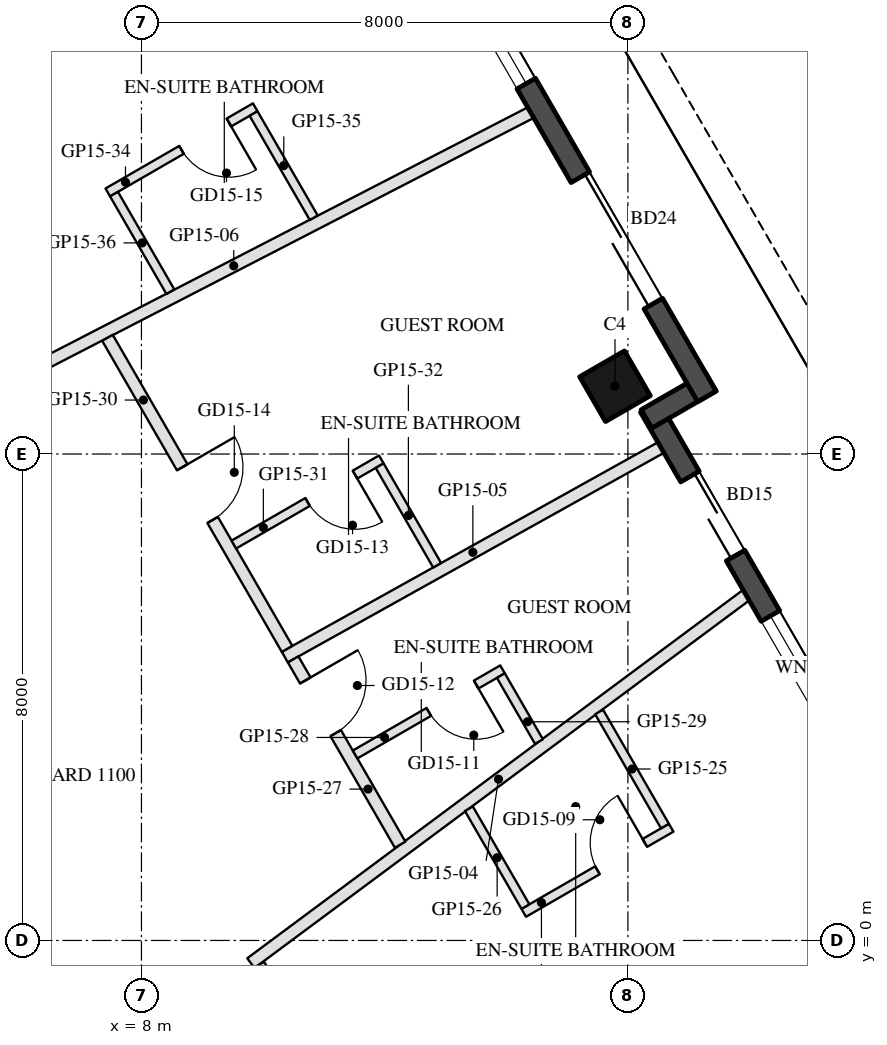
"""IFC4 building model, lengths in metres.
Left out: names, types, materials, properties, quantities, classifications, styles, units other than length and angle.
Written with IfcOpenShell. Run it as: python <this file> out.ifc"""

import sys

from ifc_helpers import new_model, si_unit, direction, frame, frame_2d, origin, origin_2d, place, context, subcontext, project, spatial, rectangle, hollow_rectangle, extrude, element, fill, save


model = new_model("IFC4")
c1 = context("Model", 3, precision=1e-05, world=origin(), true_north=direction((0.0, 1.0)))
c2 = subcontext(c1, "Body", "Model", "MODEL_VIEW")
j1 = project(units=[si_unit("LENGTHUNIT", "METRE"), si_unit("PLANEANGLEUNIT", "RADIAN")], contexts=[c1])
p1 = place(None, origin())
s1 = spatial("IfcSite", under=j1, at=p1, CompositionType="ELEMENT")
p2 = place(p1, origin())
s2 = spatial("IfcBuilding", under=s1, at=p2, CompositionType="ELEMENT")
p3 = place(p2, frame((0.0, 0.0, 172.5)))
s3 = spatial("IfcBuildingStorey", under=s2, at=p3, CompositionType="ELEMENT", Elevation=172.5)
p4 = place(p3, frame((15.788, 9.115, 0.0), z_axis=(0.0, 0.0, 1.0), x_axis=(-0.5, 0.866025403784, 0.0)))
e1 = element("IfcColumn", 1, at=p4, inside=s3, PredefinedType="COLUMN", context=c2, shape_type="SweptSolid", body=[
    extrude(hollow_rectangle(XDim=0.85, YDim=0.85, WallThickness=0.04, at=origin_2d()), origin(), (0.0, 0.0, 1.0), 3.7),
])
p5 = place(p3, frame((19.729, 2.938, 0.0), z_axis=(0.0, 0.0, 1.0), x_axis=(-0.499976430342, 0.866039011305, 0.0)))
e2 = element("IfcWall", 2, at=p5, inside=s3, PredefinedType="SOLIDWALL", context=c2, shape_type="SweptSolid", body=[
    extrude(rectangle(XDim=6.74, YDim=0.35, at=frame_2d((3.37, 0.0))), origin(), (0.0, 0.0, 1.0), 3.55),
])
p6 = place(p5, frame((0.77, 0.0, 0.3)))
e3 = element("IfcOpeningElement", 3, at=p6, cuts=e2, PredefinedType="OPENING", context=c2, shape_type="SweptSolid", body=[
    extrude(rectangle(XDim=2.0, YDim=2.65, at=frame_2d((1.0, 1.325))), frame((0.0, 0.185, 0.0), z_axis=(0.0, -1.0, 0.0), x_axis=(1.0, 0.0, 0.0)), (0.0, 0.0, 1.0), 0.37),
])
p7 = place(p5, frame((3.917, 0.0, 0.0)))
e4 = element("IfcOpeningElement", 4, at=p7, cuts=e2, PredefinedType="OPENING", context=c2, shape_type="SweptSolid", body=[
    extrude(rectangle(XDim=1.5, YDim=2.4, at=frame_2d((0.75, 1.2))), frame((0.0, 0.185, 0.0), z_axis=(0.0, -1.0, 0.0), x_axis=(1.0, 0.0, 0.0)), (0.0, 0.0, 1.0), 0.37),
])
p8 = place(p3, frame((16.306, 8.577, 0.0), z_axis=(0.0, 0.0, 1.0), x_axis=(0.866092288191, 0.499884134912, 0.0)))
e5 = element("IfcWall", 5, at=p8, inside=s3, PredefinedType="SOLIDWALL", context=c2, shape_type="SweptSolid", body=[
    extrude(rectangle(XDim=1.22, YDim=0.35, at=frame_2d((0.61, 0.0))), origin(), (0.0, 0.0, 1.0), 3.55),
])
p9 = place(p3, frame((17.299, 8.948, 0.0), z_axis=(0.0, 0.0, 1.0), x_axis=(-0.500010041276, 0.866019606374, 0.0)))
e6 = element("IfcWall", 6, at=p9, inside=s3, PredefinedType="SOLIDWALL", context=c2, shape_type="SweptSolid", body=[
    extrude(rectangle(XDim=9.7, YDim=0.35, at=frame_2d((4.85, 0.0))), origin(), (0.0, 0.0, 1.0), 3.55),
])
p10 = place(p9, frame((1.762, 0.0, 0.0)))
e7 = element("IfcOpeningElement", 7, at=p10, cuts=e6, PredefinedType="OPENING", context=c2, shape_type="SweptSolid", body=[
    extrude(rectangle(XDim=2.4, YDim=2.4, at=frame_2d((1.2, 1.2))), frame((0.0, 0.185, 0.0), z_axis=(0.0, -1.0, 0.0), x_axis=(1.0, 0.0, 0.0)), (0.0, 0.0, 1.0), 0.37),
])
p11 = place(p9, frame((5.941, 0.0, 0.3)))
e8 = element("IfcOpeningElement", 8, at=p11, cuts=e6, PredefinedType="OPENING", context=c2, shape_type="SweptSolid", body=[
    extrude(rectangle(XDim=2.0, YDim=2.65, at=frame_2d((1.0, 1.325))), frame((0.0, 0.185, 0.0), z_axis=(0.0, -1.0, 0.0), x_axis=(1.0, 0.0, 0.0)), (0.0, 0.0, 1.0), 0.37),
])
p12 = place(p3, frame((17.945, 5.679, 0.0), z_axis=(0.0, 0.0, 1.0), x_axis=(-0.802677042984, -0.596413920584, 0.0)))
e9 = element("IfcWall", 9, at=p12, inside=s3, PredefinedType="PARTITIONING", context=c2, shape_type="SweptSolid", body=[
    extrude(rectangle(XDim=10.147, YDim=0.2, at=frame_2d((5.074, 0.0))), origin(), (0.0, 0.0, 1.0), 2.95),
])
p13 = place(p3, frame((16.543, 8.106, 0.0), z_axis=(0.0, 0.0, 1.0), x_axis=(-0.873587451419, -0.486667201199, 0.0)))
e10 = element("IfcWall", 10, at=p13, inside=s3, PredefinedType="PARTITIONING", context=c2, shape_type="SweptSolid", body=[
    extrude(rectangle(XDim=7.081, YDim=0.2, at=frame_2d((3.541, 0.0))), origin(), (0.0, 0.0, 1.0), 3.06),
])
p14 = place(p3, frame((14.402, 13.615, 0.0), z_axis=(0.0, 0.0, 1.0), x_axis=(-0.888691893785, -0.458504872299, 0.0)))
e11 = element("IfcWall", 11, at=p14, inside=s3, PredefinedType="PARTITIONING", context=c2, shape_type="SweptSolid", body=[
    extrude(rectangle(XDim=10.992, YDim=0.2, at=frame_2d((5.496, 0.0))), origin(), (0.0, 0.0, 1.0), 3.06),
])
p15 = place(p3, frame((9.931, -0.401, 0.0), z_axis=(0.0, 0.0, 1.0), x_axis=(0.5000418389, -0.866001246737, 0.0)))
e12 = element("IfcWall", 12, at=p15, inside=s3, PredefinedType="PARTITIONING", context=c2, shape_type="SweptSolid", body=[
    extrude(rectangle(XDim=4.676, YDim=0.2, at=frame_2d((2.338, 0.0))), origin(), (0.0, 0.0, 1.0), 2.95),
])
p16 = place(p15, frame((1.838, 0.0, 0.0)))
e13 = element("IfcOpeningElement", 13, at=p16, cuts=e12, PredefinedType="OPENING", context=c2, shape_type="SweptSolid", body=[
    extrude(rectangle(XDim=1.0, YDim=2.1, at=frame_2d((0.5, 1.05))), frame((0.0, 0.11, 0.0), z_axis=(0.0, -1.0, 0.0), x_axis=(1.0, 0.0, 0.0)), (0.0, 0.0, 1.0), 0.22),
])
p17 = place(p3, frame((14.287, 0.454, 0.0), z_axis=(0.0, 0.0, 1.0), x_axis=(0.866034573852, 0.49998411664, 0.0)))
e14 = element("IfcWall", 14, at=p17, inside=s3, PredefinedType="PARTITIONING", context=c2, shape_type="SweptSolid", body=[
    extrude(rectangle(XDim=2.8, YDim=0.15, at=frame_2d((1.4, 0.0))), origin(), (0.0, 0.0, 1.0), 3.55),
])
p18 = place(p17, frame((1.4, 0.0, 0.0)))
e15 = element("IfcOpeningElement", 15, at=p18, cuts=e14, PredefinedType="OPENING", context=c2, shape_type="SweptSolid", body=[
    extrude(rectangle(XDim=0.9, YDim=2.1, at=frame_2d((0.45, 1.05))), frame((0.0, 0.085, 0.0), z_axis=(0.0, -1.0, 0.0), x_axis=(1.0, 0.0, 0.0)), (0.0, 0.0, 1.0), 0.17),
])
p19 = place(p3, frame((16.61, 1.882, 0.0), z_axis=(0.0, 0.0, 1.0), x_axis=(-0.500018419339, 0.866014769113, 0.0)))
e16 = element("IfcWall", 16, at=p19, inside=s3, PredefinedType="PARTITIONING", context=c2, shape_type="SweptSolid", body=[
    extrude(rectangle(XDim=2.166, YDim=0.15, at=frame_2d((1.083, 0.0))), origin(), (0.0, 0.0, 1.0), 3.55),
])
p20 = place(p3, frame((14.314, 0.557, 0.0), z_axis=(0.0, 0.0, 1.0), x_axis=(-0.500052179009, 0.865995276124, 0.0)))
e17 = element("IfcWall", 17, at=p20, inside=s3, PredefinedType="PARTITIONING", context=c2, shape_type="SweptSolid", body=[
    extrude(rectangle(XDim=1.859, YDim=0.15, at=frame_2d((0.929, 0.0))), origin(), (0.0, 0.0, 1.0), 3.55),
])
p21 = place(p3, frame((10.495, 4.622, 0.0), z_axis=(0.0, 0.0, 1.0), x_axis=(0.500004750779, -0.866022660904, 0.0)))
e18 = element("IfcWall", 18, at=p21, inside=s3, PredefinedType="PARTITIONING", context=c2, shape_type="SweptSolid", body=[
    extrude(rectangle(XDim=3.519, YDim=0.2, at=frame_2d((1.759, 0.0))), origin(), (0.0, 0.0, 1.0), 2.95),
])
p22 = place(p21, frame((0.4, 0.0, 0.0)))
e19 = element("IfcOpeningElement", 19, at=p22, cuts=e18, PredefinedType="OPENING", context=c2, shape_type="SweptSolid", body=[
    extrude(rectangle(XDim=1.0, YDim=2.1, at=frame_2d((0.5, 1.05))), frame((0.0, 0.11, 0.0), z_axis=(0.0, -1.0, 0.0), x_axis=(1.0, 0.0, 0.0)), (0.0, 0.0, 1.0), 0.22),
])
p23 = place(p3, frame((13.938, 4.458, 0.0), z_axis=(0.0, 0.0, 1.0), x_axis=(-0.866034573852, -0.49998411664, 0.0)))
e20 = element("IfcWall", 20, at=p23, inside=s3, PredefinedType="PARTITIONING", context=c2, shape_type="SweptSolid", body=[
    extrude(rectangle(XDim=2.8, YDim=0.15, at=frame_2d((1.4, 0.0))), origin(), (0.0, 0.0, 1.0), 3.55),
])
p24 = place(p23, frame((0.5, 0.0, 0.0)))
e21 = element("IfcOpeningElement", 21, at=p24, cuts=e20, PredefinedType="OPENING", context=c2, shape_type="SweptSolid", body=[
    extrude(rectangle(XDim=0.9, YDim=2.1, at=frame_2d((0.45, 1.05))), frame((0.0, 0.085, 0.0), z_axis=(0.0, -1.0, 0.0), x_axis=(1.0, 0.0, 0.0)), (0.0, 0.0, 1.0), 0.17),
])
p25 = place(p3, frame((14.537, 3.271, 0.0), z_axis=(0.0, 0.0, 1.0), x_axis=(-0.500037327496, 0.866003851672, 0.0)))
e22 = element("IfcWall", 22, at=p25, inside=s3, PredefinedType="PARTITIONING", context=c2, shape_type="SweptSolid", body=[
    extrude(rectangle(XDim=1.253, YDim=0.15, at=frame_2d((0.626, 0.0))), origin(), (0.0, 0.0, 1.0), 2.95),
])
p26 = place(p3, frame((7.441, 9.911, 0.0), z_axis=(0.0, 0.0, 1.0), x_axis=(0.500006275671, -0.866021780494, 0.0)))
e23 = element("IfcWall", 23, at=p26, inside=s3, PredefinedType="PARTITIONING", context=c2, shape_type="SweptSolid", body=[
    extrude(rectangle(XDim=5.907, YDim=0.2, at=frame_2d((2.954, 0.0))), origin(), (0.0, 0.0, 1.0), 2.95),
])
p27 = place(p26, frame((2.458, 0.0, 0.0)))
e24 = element("IfcOpeningElement", 24, at=p27, cuts=e23, PredefinedType="OPENING", context=c2, shape_type="SweptSolid", body=[
    extrude(rectangle(XDim=1.0, YDim=2.1, at=frame_2d((0.5, 1.05))), frame((0.0, 0.11, 0.0), z_axis=(0.0, -1.0, 0.0), x_axis=(1.0, 0.0, 0.0)), (0.0, 0.0, 1.0), 0.22),
])
p28 = place(p3, frame((11.945, 7.911, 0.0), z_axis=(0.0, 0.0, 1.0), x_axis=(-0.865996816683, -0.500049511043, 0.0)))
e25 = element("IfcWall", 25, at=p28, inside=s3, PredefinedType="PARTITIONING", context=c2, shape_type="SweptSolid", body=[
    extrude(rectangle(XDim=2.8, YDim=0.15, at=frame_2d((1.4, 0.0))), origin(), (0.0, 0.0, 1.0), 3.55),
])
p29 = place(p28, frame((0.5, 0.0, 0.0)))
e26 = element("IfcOpeningElement", 26, at=p29, cuts=e25, PredefinedType="OPENING", context=c2, shape_type="SweptSolid", body=[
    extrude(rectangle(XDim=0.9, YDim=2.1, at=frame_2d((0.45, 1.05))), frame((0.0, 0.085, 0.0), z_axis=(0.0, -1.0, 0.0), x_axis=(1.0, 0.0, 0.0)), (0.0, 0.0, 1.0), 0.17),
])
p30 = place(p3, frame((12.863, 6.171, 0.0), z_axis=(0.0, 0.0, 1.0), x_axis=(-0.499998034377, 0.866026538634, 0.0)))
e27 = element("IfcWall", 27, at=p30, inside=s3, PredefinedType="PARTITIONING", context=c2, shape_type="SweptSolid", body=[
    extrude(rectangle(XDim=1.892, YDim=0.15, at=frame_2d((0.946, 0.0))), origin(), (0.0, 0.0, 1.0), 2.95),
])
p31 = place(p3, frame((9.871, 13.702, 0.0), z_axis=(0.0, 0.0, 1.0), x_axis=(-0.866034573852, -0.49998411664, 0.0)))
e28 = element("IfcWall", 28, at=p31, inside=s3, PredefinedType="PARTITIONING", context=c2, shape_type="SweptSolid", body=[
    extrude(rectangle(XDim=2.8, YDim=0.15, at=frame_2d((1.4, 0.0))), origin(), (0.0, 0.0, 1.0), 3.55),
])
p32 = place(p31, frame((0.5, 0.0, 0.0)))
e29 = element("IfcOpeningElement", 29, at=p32, cuts=e28, PredefinedType="OPENING", context=c2, shape_type="SweptSolid", body=[
    extrude(rectangle(XDim=0.9, YDim=2.1, at=frame_2d((0.45, 1.05))), frame((0.0, 0.085, 0.0), z_axis=(0.0, -1.0, 0.0), x_axis=(1.0, 0.0, 0.0)), (0.0, 0.0, 1.0), 0.17),
])
p33 = place(p3, frame((10.833, 11.886, 0.0), z_axis=(0.0, 0.0, 1.0), x_axis=(-0.500000102728, 0.866025344474, 0.0)))
e30 = element("IfcWall", 30, at=p33, inside=s3, PredefinedType="PARTITIONING", context=c2, shape_type="SweptSolid", body=[
    extrude(rectangle(XDim=1.979, YDim=0.15, at=frame_2d((0.99, 0.0))), origin(), (0.0, 0.0, 1.0), 3.55),
])
p34 = place(p3, frame((8.476, 10.67, 0.0), z_axis=(0.0, 0.0, 1.0), x_axis=(-0.499992292652, 0.866029853578, 0.0)))
e31 = element("IfcWall", 31, at=p34, inside=s3, PredefinedType="PARTITIONING", context=c2, shape_type="SweptSolid", body=[
    extrude(rectangle(XDim=1.854, YDim=0.15, at=frame_2d((0.927, 0.0))), origin(), (0.0, 0.0, 1.0), 3.55),
])
p35 = place(p6, origin())
e32 = element("IfcWindow", 32, at=p35, inside=s3, PartitioningType="SINGLE_PANEL", PredefinedType="WINDOW", context=c2, shape_type="SweptSolid", body=[
    extrude(rectangle(XDim=2.0, YDim=2.65, at=frame_2d((1.0, 1.325))), frame((0.0, 0.03, 0.0), z_axis=(0.0, -1.0, 0.0), x_axis=(1.0, 0.0, 0.0)), (0.0, 0.0, 1.0), 0.06),
])
fill(e3, e32)
p36 = place(p7, frame((1.5, 0.0, 0.0), z_axis=(0.0, 0.0, 1.0), x_axis=(-1.0, 0.0, 0.0)))
e33 = element("IfcDoor", 33, at=p36, inside=s3, OperationType="SLIDING_TO_LEFT", PredefinedType="DOOR", context=c2, shape_type="SweptSolid", body=[
    extrude(rectangle(XDim=1.5, YDim=2.4, at=frame_2d((0.75, 1.2))), frame((0.0, 0.025, 0.0), z_axis=(0.0, -1.0, 0.0), x_axis=(1.0, 0.0, 0.0)), (0.0, 0.0, 1.0), 0.05),
])
fill(e4, e33)
p37 = place(p10, frame((2.4, 0.0, 0.0), z_axis=(0.0, 0.0, 1.0), x_axis=(-1.0, 0.0, 0.0)))
e34 = element("IfcDoor", 34, at=p37, inside=s3, OperationType="SLIDING_TO_LEFT", PredefinedType="DOOR", context=c2, shape_type="SweptSolid", body=[
    extrude(rectangle(XDim=2.4, YDim=2.4, at=frame_2d((1.2, 1.2))), frame((0.0, 0.025, 0.0), z_axis=(0.0, -1.0, 0.0), x_axis=(1.0, 0.0, 0.0)), (0.0, 0.0, 1.0), 0.05),
])
fill(e7, e34)
p38 = place(p11, origin())
e35 = element("IfcWindow", 35, at=p38, inside=s3, PartitioningType="SINGLE_PANEL", PredefinedType="WINDOW", context=c2, shape_type="SweptSolid", body=[
    extrude(rectangle(XDim=2.0, YDim=2.65, at=frame_2d((1.0, 1.325))), frame((0.0, 0.03, 0.0), z_axis=(0.0, -1.0, 0.0), x_axis=(1.0, 0.0, 0.0)), (0.0, 0.0, 1.0), 0.06),
])
fill(e8, e35)
p39 = place(p18, origin())
e36 = element("IfcDoor", 36, at=p39, inside=s3, OperationType="SINGLE_SWING_RIGHT", PredefinedType="DOOR", context=c2, shape_type="SweptSolid", body=[
    extrude(rectangle(XDim=0.9, YDim=2.1, at=frame_2d((0.45, 1.05))), frame((0.0, 0.025, 0.0), z_axis=(0.0, -1.0, 0.0), x_axis=(1.0, 0.0, 0.0)), (0.0, 0.0, 1.0), 0.05),
])
fill(e15, e36)
p40 = place(p24, origin())
e37 = element("IfcDoor", 37, at=p40, inside=s3, OperationType="SINGLE_SWING_LEFT", PredefinedType="DOOR", context=c2, shape_type="SweptSolid", body=[
    extrude(rectangle(XDim=0.9, YDim=2.1, at=frame_2d((0.45, 1.05))), frame((0.0, 0.025, 0.0), z_axis=(0.0, -1.0, 0.0), x_axis=(1.0, 0.0, 0.0)), (0.0, 0.0, 1.0), 0.05),
])
fill(e21, e37)
p41 = place(p22, origin())
e38 = element("IfcDoor", 38, at=p41, inside=s3, OperationType="SINGLE_SWING_LEFT", PredefinedType="DOOR", context=c2, shape_type="SweptSolid", body=[
    extrude(rectangle(XDim=1.0, YDim=2.1, at=frame_2d((0.5, 1.05))), frame((0.0, 0.025, 0.0), z_axis=(0.0, -1.0, 0.0), x_axis=(1.0, 0.0, 0.0)), (0.0, 0.0, 1.0), 0.05),
])
fill(e19, e38)
p42 = place(p29, origin())
e39 = element("IfcDoor", 39, at=p42, inside=s3, OperationType="SINGLE_SWING_LEFT", PredefinedType="DOOR", context=c2, shape_type="SweptSolid", body=[
    extrude(rectangle(XDim=0.9, YDim=2.1, at=frame_2d((0.45, 1.05))), frame((0.0, 0.025, 0.0), z_axis=(0.0, -1.0, 0.0), x_axis=(1.0, 0.0, 0.0)), (0.0, 0.0, 1.0), 0.05),
])
fill(e26, e39)
p43 = place(p27, origin())
e40 = element("IfcDoor", 40, at=p43, inside=s3, OperationType="SINGLE_SWING_LEFT", PredefinedType="DOOR", context=c2, shape_type="SweptSolid", body=[
    extrude(rectangle(XDim=1.0, YDim=2.1, at=frame_2d((0.5, 1.05))), frame((0.0, 0.025, 0.0), z_axis=(0.0, -1.0, 0.0), x_axis=(1.0, 0.0, 0.0)), (0.0, 0.0, 1.0), 0.05),
])
fill(e24, e40)
p44 = place(p32, origin())
e41 = element("IfcDoor", 41, at=p44, inside=s3, OperationType="SINGLE_SWING_LEFT", PredefinedType="DOOR", context=c2, shape_type="SweptSolid", body=[
    extrude(rectangle(XDim=0.9, YDim=2.1, at=frame_2d((0.45, 1.05))), frame((0.0, 0.025, 0.0), z_axis=(0.0, -1.0, 0.0), x_axis=(1.0, 0.0, 0.0)), (0.0, 0.0, 1.0), 0.05),
])
fill(e29, e41)
save(model, sys.argv[1])
